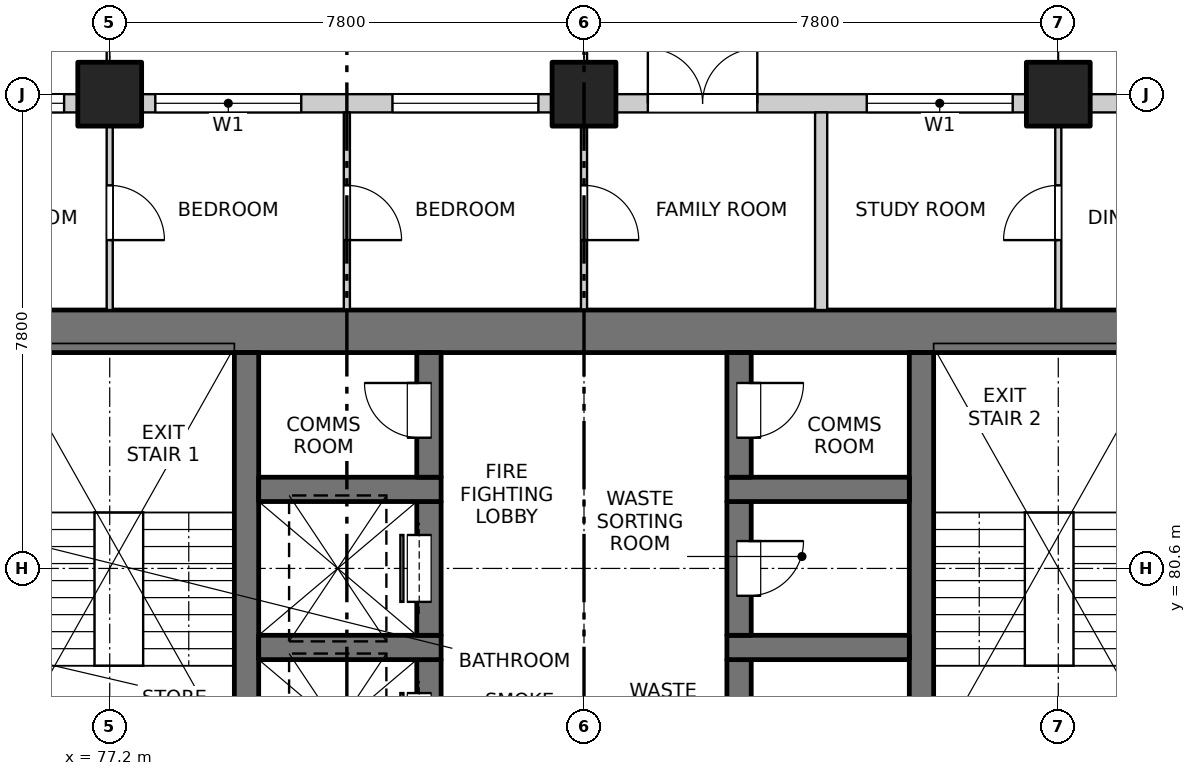
"""IFC4 building model, lengths in metres.
Left out: names, types, materials, properties, quantities, classifications, styles, units other than length and angle.
Written with IfcOpenShell. Run it as: python <this file> out.ifc"""

import sys

from ifc_helpers import new_model, si_unit, direction, frame, frame_2d, origin, origin_2d, place, context, subcontext, project, spatial, rectangle, extrude, element, fill, save


model = new_model("IFC4")
c1 = context("Model", 3, precision=1e-05, world=origin(), true_north=direction((0.0, 1.0)))
c2 = subcontext(c1, "Body", "Model", "MODEL_VIEW")
j1 = project(units=[si_unit("LENGTHUNIT", "METRE"), si_unit("PLANEANGLEUNIT", "RADIAN")], contexts=[c1])
p1 = place(None, origin())
s1 = spatial("IfcSite", under=j1, at=p1, CompositionType="ELEMENT")
p2 = place(p1, origin())
s2 = spatial("IfcBuilding", under=s1, at=p2, CompositionType="ELEMENT")
p3 = place(p2, frame((0.0, 0.0, 29.7)))
s3 = spatial("IfcBuildingStorey", under=s2, at=p3, CompositionType="ELEMENT", Elevation=29.7)
for number, where, z_axis, x_axis in (
    (1, (77.2, 88.4, -0.25), (0.0, 0.0, 1.0), (1.0, 0.0, 0.0)),
    (2, (85.0, 88.4, -0.25), (0.0, 0.0, 1.0), (1.0, 0.0, 0.0)),
    (3, (92.8, 88.4, -0.25), (0.0, 0.0, 1.0), (1.0, 0.0, 0.0)),
):
    element("IfcColumn", number, at=place(p3, frame(where, z_axis=z_axis, x_axis=x_axis)), inside=s3, PredefinedType="COLUMN", context=c2, shape_type="SweptSolid", body=[
        extrude(rectangle(XDim=1.05, YDim=1.05, at=origin_2d()), origin(), (0.0, 0.0, 1.0), 3.4),
    ])
p4 = place(p3, frame((75.6, 84.5, -0.25), z_axis=(0.0, 0.0, 1.0), x_axis=(1.0, 0.0, 0.0)))
e4 = element("IfcWall", 4, at=p4, inside=s3, PredefinedType="SOLIDWALL", context=c2, shape_type="SweptSolid", body=[
    extrude(rectangle(XDim=18.8, YDim=0.7, at=frame_2d((9.4, 0.0))), origin(), (0.0, 0.0, 1.0), 3.4),
])
for number, where, z_axis, x_axis in (
    (5, (79.45, 77.3, -0.25), (0.0, 0.0, 1.0), (0.0, 1.0, 0.0)),
    (6, (90.55, 77.3, -0.25), (0.0, 0.0, 1.0), (0.0, 1.0, 0.0)),
):
    element("IfcWall", number, at=place(p3, frame(where, z_axis=z_axis, x_axis=x_axis)), inside=s3, PredefinedType="SOLIDWALL", context=c2, shape_type="SweptSolid", body=[
        extrude(rectangle(XDim=6.85, YDim=0.4, at=frame_2d((3.425, 0.0))), origin(), (0.0, 0.0, 1.0), 3.4),
    ])
p5 = place(p3, frame((82.45, 76.9, -0.25), z_axis=(0.0, 0.0, 1.0), x_axis=(0.0, 1.0, 0.0)))
e7 = element("IfcWall", 7, at=p5, inside=s3, PredefinedType="SOLIDWALL", context=c2, shape_type="SweptSolid", body=[
    extrude(rectangle(XDim=2.2, YDim=0.4, at=frame_2d((1.1, 0.0))), origin(), (0.0, 0.0, 1.0), 3.4),
])
p6 = place(p5, frame((0.55, 0.0, 0.25)))
e8 = element("IfcOpeningElement", 8, at=p6, cuts=e7, PredefinedType="OPENING", context=c2, shape_type="SweptSolid", body=[
    extrude(rectangle(XDim=1.1, YDim=2.1, at=frame_2d((0.55, 1.05))), frame((0.0, 0.21, 0.0), z_axis=(0.0, -1.0, 0.0), x_axis=(1.0, 0.0, 0.0)), (0.0, 0.0, 1.0), 0.42),
])
p7 = place(p3, frame((79.65, 79.3, -0.25), z_axis=(0.0, 0.0, 1.0), x_axis=(1.0, 0.0, 0.0)))
e9 = element("IfcWall", 9, at=p7, inside=s3, PredefinedType="SOLIDWALL", context=c2, shape_type="SweptSolid", body=[
    extrude(rectangle(XDim=3.0, YDim=0.4, at=frame_2d((1.5, 0.0))), origin(), (0.0, 0.0, 1.0), 3.4),
])
p8 = place(p3, frame((82.45, 79.5, -0.25), z_axis=(0.0, 0.0, 1.0), x_axis=(0.0, 1.0, 0.0)))
e10 = element("IfcWall", 10, at=p8, inside=s3, PredefinedType="SOLIDWALL", context=c2, shape_type="SweptSolid", body=[
    extrude(rectangle(XDim=2.2, YDim=0.4, at=frame_2d((1.1, 0.0))), origin(), (0.0, 0.0, 1.0), 3.4),
])
p9 = place(p8, frame((0.55, 0.0, 0.25)))
e11 = element("IfcOpeningElement", 11, at=p9, cuts=e10, PredefinedType="OPENING", context=c2, shape_type="SweptSolid", body=[
    extrude(rectangle(XDim=1.1, YDim=2.1, at=frame_2d((0.55, 1.05))), frame((0.0, 0.21, 0.0), z_axis=(0.0, -1.0, 0.0), x_axis=(1.0, 0.0, 0.0)), (0.0, 0.0, 1.0), 0.42),
])
p10 = place(p3, frame((79.65, 81.9, -0.25), z_axis=(0.0, 0.0, 1.0), x_axis=(1.0, 0.0, 0.0)))
e12 = element("IfcWall", 12, at=p10, inside=s3, PredefinedType="SOLIDWALL", context=c2, shape_type="SweptSolid", body=[
    extrude(rectangle(XDim=3.0, YDim=0.4, at=frame_2d((1.5, 0.0))), origin(), (0.0, 0.0, 1.0), 3.4),
])
p11 = place(p3, frame((82.45, 82.1, -0.25), z_axis=(0.0, 0.0, 1.0), x_axis=(0.0, 1.0, 0.0)))
e13 = element("IfcWall", 13, at=p11, inside=s3, PredefinedType="SOLIDWALL", context=c2, shape_type="SweptSolid", body=[
    extrude(rectangle(XDim=2.05, YDim=0.4, at=frame_2d((1.025, 0.0))), origin(), (0.0, 0.0, 1.0), 3.4),
])
p12 = place(p11, frame((0.65, 0.0, 0.25)))
e14 = element("IfcOpeningElement", 14, at=p12, cuts=e13, PredefinedType="OPENING", context=c2, shape_type="SweptSolid", body=[
    extrude(rectangle(XDim=0.9, YDim=2.1, at=frame_2d((0.45, 1.05))), frame((0.0, 0.21, 0.0), z_axis=(0.0, -1.0, 0.0), x_axis=(1.0, 0.0, 0.0)), (0.0, 0.0, 1.0), 0.42),
])
p13 = place(p3, frame((87.55, 76.9, -0.25), z_axis=(0.0, 0.0, 1.0), x_axis=(0.0, 1.0, 0.0)))
e15 = element("IfcWall", 15, at=p13, inside=s3, PredefinedType="SOLIDWALL", context=c2, shape_type="SweptSolid", body=[
    extrude(rectangle(XDim=2.2, YDim=0.4, at=frame_2d((1.1, 0.0))), origin(), (0.0, 0.0, 1.0), 3.4),
])
p14 = place(p13, frame((0.65, 0.0, 0.25)))
e16 = element("IfcOpeningElement", 16, at=p14, cuts=e15, PredefinedType="OPENING", context=c2, shape_type="SweptSolid", body=[
    extrude(rectangle(XDim=0.9, YDim=2.1, at=frame_2d((0.45, 1.05))), frame((0.0, 0.21, 0.0), z_axis=(0.0, -1.0, 0.0), x_axis=(1.0, 0.0, 0.0)), (0.0, 0.0, 1.0), 0.42),
])
p15 = place(p3, frame((87.35, 79.3, -0.25), z_axis=(0.0, 0.0, 1.0), x_axis=(1.0, 0.0, 0.0)))
e17 = element("IfcWall", 17, at=p15, inside=s3, PredefinedType="SOLIDWALL", context=c2, shape_type="SweptSolid", body=[
    extrude(rectangle(XDim=3.0, YDim=0.4, at=frame_2d((1.5, 0.0))), origin(), (0.0, 0.0, 1.0), 3.4),
])
p16 = place(p3, frame((87.55, 79.5, -0.25), z_axis=(0.0, 0.0, 1.0), x_axis=(0.0, 1.0, 0.0)))
e18 = element("IfcWall", 18, at=p16, inside=s3, PredefinedType="SOLIDWALL", context=c2, shape_type="SweptSolid", body=[
    extrude(rectangle(XDim=2.2, YDim=0.4, at=frame_2d((1.1, 0.0))), origin(), (0.0, 0.0, 1.0), 3.4),
])
p17 = place(p16, frame((0.65, 0.0, 0.25)))
e19 = element("IfcOpeningElement", 19, at=p17, cuts=e18, PredefinedType="OPENING", context=c2, shape_type="SweptSolid", body=[
    extrude(rectangle(XDim=0.9, YDim=2.1, at=frame_2d((0.45, 1.05))), frame((0.0, 0.21, 0.0), z_axis=(0.0, -1.0, 0.0), x_axis=(1.0, 0.0, 0.0)), (0.0, 0.0, 1.0), 0.42),
])
p18 = place(p3, frame((87.35, 81.9, -0.25), z_axis=(0.0, 0.0, 1.0), x_axis=(1.0, 0.0, 0.0)))
e20 = element("IfcWall", 20, at=p18, inside=s3, PredefinedType="SOLIDWALL", context=c2, shape_type="SweptSolid", body=[
    extrude(rectangle(XDim=3.0, YDim=0.4, at=frame_2d((1.5, 0.0))), origin(), (0.0, 0.0, 1.0), 3.4),
])
p19 = place(p3, frame((87.55, 82.1, -0.25), z_axis=(0.0, 0.0, 1.0), x_axis=(0.0, 1.0, 0.0)))
e21 = element("IfcWall", 21, at=p19, inside=s3, PredefinedType="SOLIDWALL", context=c2, shape_type="SweptSolid", body=[
    extrude(rectangle(XDim=2.05, YDim=0.4, at=frame_2d((1.025, 0.0))), origin(), (0.0, 0.0, 1.0), 3.4),
])
p20 = place(p19, frame((0.65, 0.0, 0.25)))
e22 = element("IfcOpeningElement", 22, at=p20, cuts=e21, PredefinedType="OPENING", context=c2, shape_type="SweptSolid", body=[
    extrude(rectangle(XDim=0.9, YDim=2.1, at=frame_2d((0.45, 1.05))), frame((0.0, 0.21, 0.0), z_axis=(0.0, -1.0, 0.0), x_axis=(1.0, 0.0, 0.0)), (0.0, 0.0, 1.0), 0.42),
])
p21 = place(p3, frame((69.925, 88.25, 0.0), z_axis=(0.0, 0.0, 1.0), x_axis=(1.0, 0.0, 0.0)))
e23 = element("IfcWall", 23, at=p21, inside=s3, PredefinedType="SOLIDWALL", context=c2, shape_type="SweptSolid", body=[
    extrude(rectangle(XDim=6.75, YDim=0.3, at=frame_2d((3.375, 0.0))), origin(), (0.0, 0.0, 1.0), 2.7),
])
p22 = place(p21, frame((0.525, 0.0, 0.0)))
e24 = element("IfcOpeningElement", 24, at=p22, cuts=e23, PredefinedType="OPENING", context=c2, shape_type="SweptSolid", body=[
    extrude(rectangle(XDim=1.8, YDim=2.4, at=frame_2d((0.9, 1.2))), frame((0.0, 0.16, 0.0), z_axis=(0.0, -1.0, 0.0), x_axis=(1.0, 0.0, 0.0)), (0.0, 0.0, 1.0), 0.32),
])
p23 = place(p21, frame((4.125, 0.0, 0.9)))
e25 = element("IfcOpeningElement", 25, at=p23, cuts=e23, PredefinedType="OPENING", context=c2, shape_type="SweptSolid", body=[
    extrude(rectangle(XDim=2.4, YDim=1.8, at=frame_2d((1.2, 0.9))), frame((0.0, 0.16, 0.0), z_axis=(0.0, -1.0, 0.0), x_axis=(1.0, 0.0, 0.0)), (0.0, 0.0, 1.0), 0.32),
])
p24 = place(p3, frame((77.725, 88.25, 0.0), z_axis=(0.0, 0.0, 1.0), x_axis=(1.0, 0.0, 0.0)))
e26 = element("IfcWall", 26, at=p24, inside=s3, PredefinedType="SOLIDWALL", context=c2, shape_type="SweptSolid", body=[
    extrude(rectangle(XDim=6.75, YDim=0.3, at=frame_2d((3.375, 0.0))), origin(), (0.0, 0.0, 1.0), 2.7),
])
p25 = place(p24, frame((0.225, 0.0, 0.9)))
e27 = element("IfcOpeningElement", 27, at=p25, cuts=e26, PredefinedType="OPENING", context=c2, shape_type="SweptSolid", body=[
    extrude(rectangle(XDim=2.4, YDim=1.8, at=frame_2d((1.2, 0.9))), frame((0.0, 0.16, 0.0), z_axis=(0.0, -1.0, 0.0), x_axis=(1.0, 0.0, 0.0)), (0.0, 0.0, 1.0), 0.32),
])
p26 = place(p24, frame((4.125, 0.0, 0.9)))
e28 = element("IfcOpeningElement", 28, at=p26, cuts=e26, PredefinedType="OPENING", context=c2, shape_type="SweptSolid", body=[
    extrude(rectangle(XDim=2.4, YDim=1.8, at=frame_2d((1.2, 0.9))), frame((0.0, 0.16, 0.0), z_axis=(0.0, -1.0, 0.0), x_axis=(1.0, 0.0, 0.0)), (0.0, 0.0, 1.0), 0.32),
])
p27 = place(p3, frame((85.525, 88.25, 0.0), z_axis=(0.0, 0.0, 1.0), x_axis=(1.0, 0.0, 0.0)))
e29 = element("IfcWall", 29, at=p27, inside=s3, PredefinedType="SOLIDWALL", context=c2, shape_type="SweptSolid", body=[
    extrude(rectangle(XDim=6.75, YDim=0.3, at=frame_2d((3.375, 0.0))), origin(), (0.0, 0.0, 1.0), 2.7),
])
p28 = place(p27, frame((0.525, 0.0, 0.0)))
e30 = element("IfcOpeningElement", 30, at=p28, cuts=e29, PredefinedType="OPENING", context=c2, shape_type="SweptSolid", body=[
    extrude(rectangle(XDim=1.8, YDim=2.4, at=frame_2d((0.9, 1.2))), frame((0.0, 0.16, 0.0), z_axis=(0.0, -1.0, 0.0), x_axis=(1.0, 0.0, 0.0)), (0.0, 0.0, 1.0), 0.32),
])
p29 = place(p27, frame((4.125, 0.0, 0.9)))
e31 = element("IfcOpeningElement", 31, at=p29, cuts=e29, PredefinedType="OPENING", context=c2, shape_type="SweptSolid", body=[
    extrude(rectangle(XDim=2.4, YDim=1.8, at=frame_2d((1.2, 0.9))), frame((0.0, 0.16, 0.0), z_axis=(0.0, -1.0, 0.0), x_axis=(1.0, 0.0, 0.0)), (0.0, 0.0, 1.0), 0.32),
])
p30 = place(p3, frame((93.325, 88.25, 0.0), z_axis=(0.0, 0.0, 1.0), x_axis=(1.0, 0.0, 0.0)))
e32 = element("IfcWall", 32, at=p30, inside=s3, PredefinedType="SOLIDWALL", context=c2, shape_type="SweptSolid", body=[
    extrude(rectangle(XDim=6.75, YDim=0.3, at=frame_2d((3.375, 0.0))), origin(), (0.0, 0.0, 1.0), 2.7),
])
p31 = place(p30, frame((0.525, 0.0, 0.0)))
e33 = element("IfcOpeningElement", 33, at=p31, cuts=e32, PredefinedType="OPENING", context=c2, shape_type="SweptSolid", body=[
    extrude(rectangle(XDim=1.8, YDim=2.4, at=frame_2d((0.9, 1.2))), frame((0.0, 0.16, 0.0), z_axis=(0.0, -1.0, 0.0), x_axis=(1.0, 0.0, 0.0)), (0.0, 0.0, 1.0), 0.32),
])
p32 = place(p30, frame((4.125, 0.0, 0.9)))
e34 = element("IfcOpeningElement", 34, at=p32, cuts=e32, PredefinedType="OPENING", context=c2, shape_type="SweptSolid", body=[
    extrude(rectangle(XDim=2.4, YDim=1.8, at=frame_2d((1.2, 0.9))), frame((0.0, 0.16, 0.0), z_axis=(0.0, -1.0, 0.0), x_axis=(1.0, 0.0, 0.0)), (0.0, 0.0, 1.0), 0.32),
])
p33 = place(p3, frame((77.2, 84.85, 0.0), z_axis=(0.0, 0.0, 1.0), x_axis=(0.0, 1.0, 0.0)))
e35 = element("IfcWall", 35, at=p33, inside=s3, PredefinedType="PARTITIONING", context=c2, shape_type="SweptSolid", body=[
    extrude(rectangle(XDim=3.25, YDim=0.1, at=frame_2d((1.625, 0.0))), origin(), (0.0, 0.0, 1.0), 3.15),
])
p34 = place(p33, frame((1.15, 0.0, 0.0)))
e36 = element("IfcOpeningElement", 36, at=p34, cuts=e35, PredefinedType="OPENING", context=c2, shape_type="SweptSolid", body=[
    extrude(rectangle(XDim=0.9, YDim=2.1, at=frame_2d((0.45, 1.05))), frame((0.0, 0.06, 0.0), z_axis=(0.0, -1.0, 0.0), x_axis=(1.0, 0.0, 0.0)), (0.0, 0.0, 1.0), 0.12),
])
p35 = place(p3, frame((81.1, 84.85, 0.0), z_axis=(0.0, 0.0, 1.0), x_axis=(0.0, 1.0, 0.0)))
e37 = element("IfcWall", 37, at=p35, inside=s3, PredefinedType="PARTITIONING", context=c2, shape_type="SweptSolid", body=[
    extrude(rectangle(XDim=3.25, YDim=0.1, at=frame_2d((1.625, 0.0))), origin(), (0.0, 0.0, 1.0), 3.15),
])
p36 = place(p35, frame((1.15, 0.0, 0.0)))
e38 = element("IfcOpeningElement", 38, at=p36, cuts=e37, PredefinedType="OPENING", context=c2, shape_type="SweptSolid", body=[
    extrude(rectangle(XDim=0.9, YDim=2.1, at=frame_2d((0.45, 1.05))), frame((0.0, 0.06, 0.0), z_axis=(0.0, -1.0, 0.0), x_axis=(1.0, 0.0, 0.0)), (0.0, 0.0, 1.0), 0.12),
])
p37 = place(p3, frame((85.0, 84.85, 0.0), z_axis=(0.0, 0.0, 1.0), x_axis=(0.0, 1.0, 0.0)))
e39 = element("IfcWall", 39, at=p37, inside=s3, PredefinedType="PARTITIONING", context=c2, shape_type="SweptSolid", body=[
    extrude(rectangle(XDim=3.25, YDim=0.1, at=frame_2d((1.625, 0.0))), origin(), (0.0, 0.0, 1.0), 3.15),
])
p38 = place(p37, frame((1.15, 0.0, 0.0)))
e40 = element("IfcOpeningElement", 40, at=p38, cuts=e39, PredefinedType="OPENING", context=c2, shape_type="SweptSolid", body=[
    extrude(rectangle(XDim=0.9, YDim=2.1, at=frame_2d((0.45, 1.05))), frame((0.0, 0.06, 0.0), z_axis=(0.0, -1.0, 0.0), x_axis=(1.0, 0.0, 0.0)), (0.0, 0.0, 1.0), 0.12),
])
p39 = place(p3, frame((88.9, 84.85, 0.0), z_axis=(0.0, 0.0, 1.0), x_axis=(0.0, 1.0, 0.0)))
e41 = element("IfcWall", 41, at=p39, inside=s3, PredefinedType="PARTITIONING", context=c2, shape_type="SweptSolid", body=[
    extrude(rectangle(XDim=3.25, YDim=0.2, at=frame_2d((1.625, 0.0))), origin(), (0.0, 0.0, 1.0), 3.15),
])
p40 = place(p3, frame((92.8, 84.85, 0.0), z_axis=(0.0, 0.0, 1.0), x_axis=(0.0, 1.0, 0.0)))
e42 = element("IfcWall", 42, at=p40, inside=s3, PredefinedType="PARTITIONING", context=c2, shape_type="SweptSolid", body=[
    extrude(rectangle(XDim=3.25, YDim=0.1, at=frame_2d((1.625, 0.0))), origin(), (0.0, 0.0, 1.0), 3.15),
])
p41 = place(p40, frame((1.15, 0.0, 0.0)))
e43 = element("IfcOpeningElement", 43, at=p41, cuts=e42, PredefinedType="OPENING", context=c2, shape_type="SweptSolid", body=[
    extrude(rectangle(XDim=0.9, YDim=2.1, at=frame_2d((0.45, 1.05))), frame((0.0, 0.06, 0.0), z_axis=(0.0, -1.0, 0.0), x_axis=(1.0, 0.0, 0.0)), (0.0, 0.0, 1.0), 0.12),
])
p42 = place(p23, origin())
e44 = element("IfcWindow", 44, at=p42, inside=s3, PartitioningType="DOUBLE_PANEL_VERTICAL", PredefinedType="WINDOW", context=c2, shape_type="SweptSolid", body=[
    extrude(rectangle(XDim=2.4, YDim=1.8, at=frame_2d((1.2, 0.9))), frame((0.0, 0.03, 0.0), z_axis=(0.0, -1.0, 0.0), x_axis=(1.0, 0.0, 0.0)), (0.0, 0.0, 1.0), 0.06),
])
fill(e25, e44)
p43 = place(p25, origin())
e45 = element("IfcWindow", 45, at=p43, inside=s3, PartitioningType="DOUBLE_PANEL_VERTICAL", PredefinedType="WINDOW", context=c2, shape_type="SweptSolid", body=[
    extrude(rectangle(XDim=2.4, YDim=1.8, at=frame_2d((1.2, 0.9))), frame((0.0, 0.03, 0.0), z_axis=(0.0, -1.0, 0.0), x_axis=(1.0, 0.0, 0.0)), (0.0, 0.0, 1.0), 0.06),
])
fill(e27, e45)
p44 = place(p26, origin())
e46 = element("IfcWindow", 46, at=p44, inside=s3, PartitioningType="DOUBLE_PANEL_VERTICAL", PredefinedType="WINDOW", context=c2, shape_type="SweptSolid", body=[
    extrude(rectangle(XDim=2.4, YDim=1.8, at=frame_2d((1.2, 0.9))), frame((0.0, 0.03, 0.0), z_axis=(0.0, -1.0, 0.0), x_axis=(1.0, 0.0, 0.0)), (0.0, 0.0, 1.0), 0.06),
])
fill(e28, e46)
p45 = place(p28, origin())
e47 = element("IfcDoor", 47, at=p45, inside=s3, OperationType="DOUBLE_DOOR_SINGLE_SWING", PredefinedType="DOOR", context=c2, shape_type="SweptSolid", body=[
    extrude(rectangle(XDim=1.8, YDim=2.4, at=frame_2d((0.9, 1.2))), frame((0.0, 0.025, 0.0), z_axis=(0.0, -1.0, 0.0), x_axis=(1.0, 0.0, 0.0)), (0.0, 0.0, 1.0), 0.05),
])
fill(e30, e47)
p46 = place(p29, origin())
e48 = element("IfcWindow", 48, at=p46, inside=s3, PartitioningType="DOUBLE_PANEL_VERTICAL", PredefinedType="WINDOW", context=c2, shape_type="SweptSolid", body=[
    extrude(rectangle(XDim=2.4, YDim=1.8, at=frame_2d((1.2, 0.9))), frame((0.0, 0.03, 0.0), z_axis=(0.0, -1.0, 0.0), x_axis=(1.0, 0.0, 0.0)), (0.0, 0.0, 1.0), 0.06),
])
fill(e31, e48)
p47 = place(p6, origin())
e49 = element("IfcDoor", 49, at=p47, inside=s3, OperationType="SLIDING_TO_LEFT", PredefinedType="DOOR", context=c2, shape_type="SweptSolid", body=[
    extrude(rectangle(XDim=1.1, YDim=2.1, at=frame_2d((0.55, 1.05))), frame((0.0, 0.185, 0.0), z_axis=(0.0, -1.0, 0.0), x_axis=(1.0, 0.0, 0.0)), (0.0, 0.0, 1.0), 0.05),
])
fill(e8, e49)
p48 = place(p9, origin())
e50 = element("IfcDoor", 50, at=p48, inside=s3, OperationType="SLIDING_TO_LEFT", PredefinedType="DOOR", context=c2, shape_type="SweptSolid", body=[
    extrude(rectangle(XDim=1.1, YDim=2.1, at=frame_2d((0.55, 1.05))), frame((0.0, 0.185, 0.0), z_axis=(0.0, -1.0, 0.0), x_axis=(1.0, 0.0, 0.0)), (0.0, 0.0, 1.0), 0.05),
])
fill(e11, e50)
p49 = place(p17, origin())
e51 = element("IfcDoor", 51, at=p49, inside=s3, OperationType="SINGLE_SWING_LEFT", PredefinedType="DOOR", context=c2, shape_type="SweptSolid", body=[
    extrude(rectangle(XDim=0.9, YDim=2.1, at=frame_2d((0.45, 1.05))), frame((0.0, -0.135, 0.0), z_axis=(0.0, -1.0, 0.0), x_axis=(1.0, 0.0, 0.0)), (0.0, 0.0, 1.0), 0.05),
])
fill(e19, e51)
p50 = place(p12, origin())
e52 = element("IfcDoor", 52, at=p50, inside=s3, OperationType="SINGLE_SWING_RIGHT", PredefinedType="DOOR", context=c2, shape_type="SweptSolid", body=[
    extrude(rectangle(XDim=0.9, YDim=2.1, at=frame_2d((0.45, 1.05))), frame((0.0, 0.185, 0.0), z_axis=(0.0, -1.0, 0.0), x_axis=(1.0, 0.0, 0.0)), (0.0, 0.0, 1.0), 0.05),
])
fill(e14, e52)
p51 = place(p20, origin())
e53 = element("IfcDoor", 53, at=p51, inside=s3, OperationType="SINGLE_SWING_LEFT", PredefinedType="DOOR", context=c2, shape_type="SweptSolid", body=[
    extrude(rectangle(XDim=0.9, YDim=2.1, at=frame_2d((0.45, 1.05))), frame((0.0, -0.135, 0.0), z_axis=(0.0, -1.0, 0.0), x_axis=(1.0, 0.0, 0.0)), (0.0, 0.0, 1.0), 0.05),
])
fill(e22, e53)
p52 = place(p34, origin())
e54 = element("IfcDoor", 54, at=p52, inside=s3, OperationType="SINGLE_SWING_RIGHT", PredefinedType="DOOR", context=c2, shape_type="SweptSolid", body=[
    extrude(rectangle(XDim=0.9, YDim=2.1, at=frame_2d((0.45, 1.05))), frame((0.0, 0.025, 0.0), z_axis=(0.0, -1.0, 0.0), x_axis=(1.0, 0.0, 0.0)), (0.0, 0.0, 1.0), 0.05),
])
fill(e36, e54)
p53 = place(p36, origin())
e55 = element("IfcDoor", 55, at=p53, inside=s3, OperationType="SINGLE_SWING_RIGHT", PredefinedType="DOOR", context=c2, shape_type="SweptSolid", body=[
    extrude(rectangle(XDim=0.9, YDim=2.1, at=frame_2d((0.45, 1.05))), frame((0.0, 0.025, 0.0), z_axis=(0.0, -1.0, 0.0), x_axis=(1.0, 0.0, 0.0)), (0.0, 0.0, 1.0), 0.05),
])
fill(e38, e55)
p54 = place(p38, origin())
e56 = element("IfcDoor", 56, at=p54, inside=s3, OperationType="SINGLE_SWING_RIGHT", PredefinedType="DOOR", context=c2, shape_type="SweptSolid", body=[
    extrude(rectangle(XDim=0.9, YDim=2.1, at=frame_2d((0.45, 1.05))), frame((0.0, 0.025, 0.0), z_axis=(0.0, -1.0, 0.0), x_axis=(1.0, 0.0, 0.0)), (0.0, 0.0, 1.0), 0.05),
])
fill(e40, e56)
p55 = place(p41, origin())
e57 = element("IfcDoor", 57, at=p55, inside=s3, OperationType="SINGLE_SWING_LEFT", PredefinedType="DOOR", context=c2, shape_type="SweptSolid", body=[
    extrude(rectangle(XDim=0.9, YDim=2.1, at=frame_2d((0.45, 1.05))), frame((0.0, 0.025, 0.0), z_axis=(0.0, -1.0, 0.0), x_axis=(1.0, 0.0, 0.0)), (0.0, 0.0, 1.0), 0.05),
])
fill(e43, e57)
save(model, sys.argv[1])
